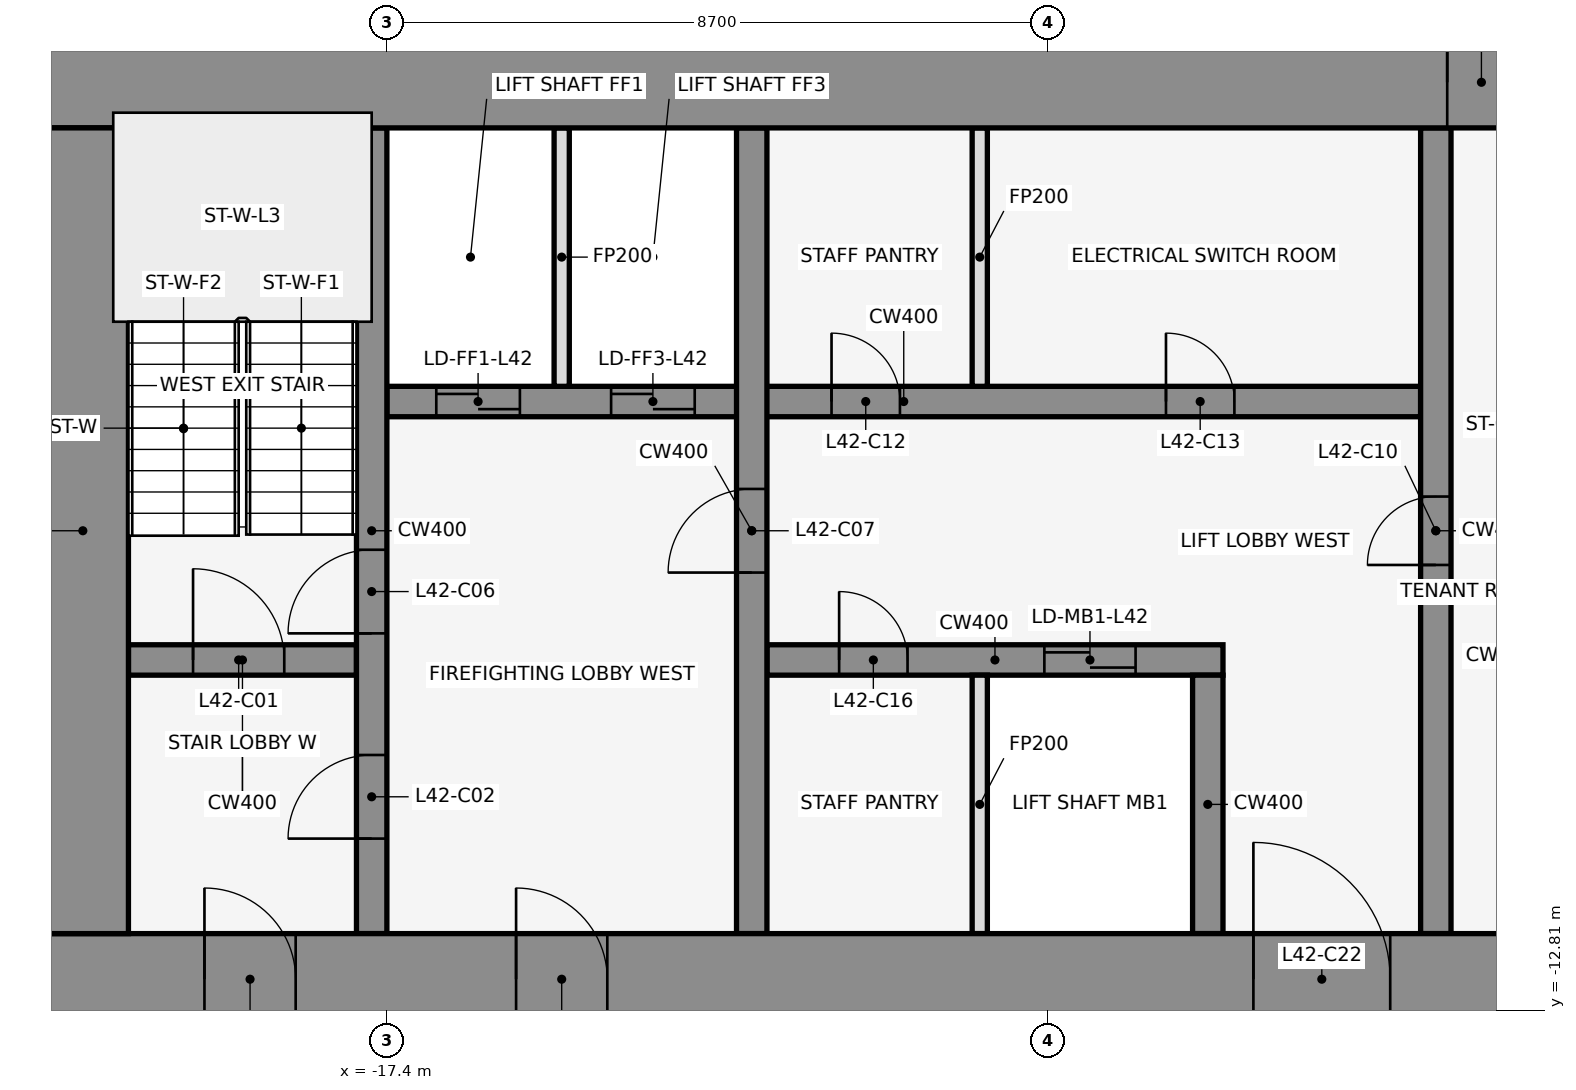
"""IFC4 building model, lengths in metres.
Left out: names, types, materials, properties, quantities, classifications, styles, units other than length and angle.
Written with IfcOpenShell. Run it as: python <this file> out.ifc"""

import sys

from ifc_helpers import new_model, si_unit, direction, frame, frame_2d, origin, place, context, subcontext, project, spatial, rectangle, extrude, element, fill, save


model = new_model("IFC4")
c1 = context("Model", 3, precision=1e-05, world=origin(), true_north=direction((0.0, 1.0)))
c2 = subcontext(c1, "Body", "Model", "MODEL_VIEW")
j1 = project(units=[si_unit("LENGTHUNIT", "METRE"), si_unit("PLANEANGLEUNIT", "RADIAN")], contexts=[c1])
p1 = place(None, origin())
s1 = spatial("IfcSite", under=j1, at=p1, CompositionType="ELEMENT")
p2 = place(p1, origin())
s2 = spatial("IfcBuilding", under=s1, at=p2, CompositionType="ELEMENT")
p3 = place(p2, frame((0.0, 0.0, 190.9)))
s3 = spatial("IfcBuildingStorey", under=s2, at=p3, CompositionType="ELEMENT", Elevation=190.9)
p4 = place(p3, frame((-14.599, 1.08, 0.0), z_axis=(0.0, 0.0, 1.0), x_axis=(-0.83981312244, -0.542875602121, 0.0)))
e1 = element("IfcWall", 1, at=p4, inside=s3, PredefinedType="STANDARD", context=c2, shape_type="SweptSolid", body=[
    extrude(rectangle(XDim=2.183, YDim=0.25, at=frame_2d((1.091, 0.0))), origin(), (0.0, 0.0, 1.0), 3.95),
])
p5 = place(p3, frame((-20.8, -8.2, 0.0), z_axis=(0.0, 0.0, 1.0), x_axis=(1.0, 0.0, 0.0)))
e2 = element("IfcWall", 2, at=p5, inside=s3, PredefinedType="SHEAR", context=c2, shape_type="SweptSolid", body=[
    extrude(rectangle(XDim=3.0, YDim=0.4, at=frame_2d((1.5, 0.0))), origin(), (0.0, 0.0, 1.0), 4.1),
])
p6 = place(p5, frame((0.85, 0.0, 0.0)))
e3 = element("IfcOpeningElement", 3, at=p6, cuts=e2, PredefinedType="OPENING", context=c2, shape_type="SweptSolid", body=[
    extrude(rectangle(XDim=1.2, YDim=2.1, at=frame_2d((0.6, 1.05))), frame((0.0, 0.212, 0.0), z_axis=(0.0, -1.0, 0.0), x_axis=(1.0, 0.0, 0.0)), (0.0, 0.0, 1.0), 0.424),
])
p7 = place(p3, frame((-12.4, -8.2, 0.0), z_axis=(0.0, 0.0, 1.0), x_axis=(1.0, 0.0, 0.0)))
e4 = element("IfcWall", 4, at=p7, inside=s3, PredefinedType="SHEAR", context=c2, shape_type="SweptSolid", body=[
    extrude(rectangle(XDim=6.0, YDim=0.4, at=frame_2d((3.0, 0.0))), origin(), (0.0, 0.0, 1.0), 4.1),
])
p8 = place(p7, frame((3.65, 0.0, 0.0)))
e5 = element("IfcOpeningElement", 5, at=p8, cuts=e4, PredefinedType="OPENING", context=c2, shape_type="SweptSolid", body=[
    extrude(rectangle(XDim=1.2, YDim=2.1, at=frame_2d((0.6, 1.05))), frame((0.0, 0.212, 0.0), z_axis=(0.0, -1.0, 0.0), x_axis=(1.0, 0.0, 0.0)), (0.0, 0.0, 1.0), 0.424),
])
p9 = place(p7, frame((0.95, 0.0, 0.0)))
e6 = element("IfcOpeningElement", 6, at=p9, cuts=e4, PredefinedType="OPENING", context=c2, shape_type="SweptSolid", body=[
    extrude(rectangle(XDim=0.9, YDim=2.1, at=frame_2d((0.45, 1.05))), frame((0.0, 0.212, 0.0), z_axis=(0.0, -1.0, 0.0), x_axis=(1.0, 0.0, 0.0)), (0.0, 0.0, 1.0), 0.424),
])
p10 = place(p3, frame((-17.4, -4.8, 0.0), z_axis=(0.0, 0.0, 1.0), x_axis=(1.0, 0.0, 0.0)))
e7 = element("IfcWall", 7, at=p10, inside=s3, PredefinedType="SHEAR", context=c2, shape_type="SweptSolid", body=[
    extrude(rectangle(XDim=13.6, YDim=0.4, at=frame_2d((6.8, 0.0))), origin(), (0.0, 0.0, 1.0), 4.1),
])
p11 = place(p10, frame((0.65, 0.0, 0.0)))
e8 = element("IfcOpeningElement", 8, at=p11, cuts=e7, PredefinedType="OPENING", context=c2, shape_type="SweptSolid", body=[
    extrude(rectangle(XDim=1.1, YDim=2.1, at=frame_2d((0.55, 1.05))), frame((0.0, 0.212, 0.0), z_axis=(0.0, -1.0, 0.0), x_axis=(1.0, 0.0, 0.0)), (0.0, 0.0, 1.0), 0.424),
])
p12 = place(p10, frame((2.95, 0.0, 0.0)))
e9 = element("IfcOpeningElement", 9, at=p12, cuts=e7, PredefinedType="OPENING", context=c2, shape_type="SweptSolid", body=[
    extrude(rectangle(XDim=1.1, YDim=2.1, at=frame_2d((0.55, 1.05))), frame((0.0, 0.212, 0.0), z_axis=(0.0, -1.0, 0.0), x_axis=(1.0, 0.0, 0.0)), (0.0, 0.0, 1.0), 0.424),
])
p13 = place(p10, frame((5.85, 0.0, 0.0)))
e10 = element("IfcOpeningElement", 10, at=p13, cuts=e7, PredefinedType="OPENING", context=c2, shape_type="SweptSolid", body=[
    extrude(rectangle(XDim=0.9, YDim=2.1, at=frame_2d((0.45, 1.05))), frame((0.0, 0.212, 0.0), z_axis=(0.0, -1.0, 0.0), x_axis=(1.0, 0.0, 0.0)), (0.0, 0.0, 1.0), 0.424),
])
p14 = place(p10, frame((10.25, 0.0, 0.0)))
e11 = element("IfcOpeningElement", 11, at=p14, cuts=e7, PredefinedType="OPENING", context=c2, shape_type="SweptSolid", body=[
    extrude(rectangle(XDim=0.9, YDim=2.1, at=frame_2d((0.45, 1.05))), frame((0.0, 0.212, 0.0), z_axis=(0.0, -1.0, 0.0), x_axis=(1.0, 0.0, 0.0)), (0.0, 0.0, 1.0), 0.424),
])
p15 = place(p3, frame((-17.6, -11.8, 0.0), z_axis=(0.0, 0.0, 1.0), x_axis=(0.0, 1.0, 0.0)))
e12 = element("IfcWall", 12, at=p15, inside=s3, PredefinedType="SHEAR", context=c2, shape_type="SweptSolid", body=[
    extrude(rectangle(XDim=10.6, YDim=0.4, at=frame_2d((5.3, 0.0))), origin(), (0.0, 0.0, 1.0), 4.1),
])
p16 = place(p15, frame((1.25, 0.0, 0.0)))
e13 = element("IfcOpeningElement", 13, at=p16, cuts=e12, PredefinedType="OPENING", context=c2, shape_type="SweptSolid", body=[
    extrude(rectangle(XDim=1.1, YDim=2.1, at=frame_2d((0.55, 1.05))), frame((0.0, 0.212, 0.0), z_axis=(0.0, -1.0, 0.0), x_axis=(1.0, 0.0, 0.0)), (0.0, 0.0, 1.0), 0.424),
])
p17 = place(p15, frame((3.95, 0.0, 0.0)))
e14 = element("IfcOpeningElement", 14, at=p17, cuts=e12, PredefinedType="OPENING", context=c2, shape_type="SweptSolid", body=[
    extrude(rectangle(XDim=1.1, YDim=2.1, at=frame_2d((0.55, 1.05))), frame((0.0, 0.212, 0.0), z_axis=(0.0, -1.0, 0.0), x_axis=(1.0, 0.0, 0.0)), (0.0, 0.0, 1.0), 0.424),
])
p18 = place(p3, frame((-15.1, -4.6, 0.0), z_axis=(0.0, 0.0, 1.0), x_axis=(0.0, 1.0, 0.0)))
e15 = element("IfcWall", 15, at=p18, inside=s3, PredefinedType="PARTITIONING", context=c2, shape_type="SweptSolid", body=[
    extrude(rectangle(XDim=3.4, YDim=0.2, at=frame_2d((1.7, 0.0))), origin(), (0.0, 0.0, 1.0), 2.96),
])
p19 = place(p3, frame((-12.6, -11.8, 0.0), z_axis=(0.0, 0.0, 1.0), x_axis=(0.0, 1.0, 0.0)))
e16 = element("IfcWall", 16, at=p19, inside=s3, PredefinedType="SHEAR", context=c2, shape_type="SweptSolid", body=[
    extrude(rectangle(XDim=10.6, YDim=0.4, at=frame_2d((5.3, 0.0))), origin(), (0.0, 0.0, 1.0), 4.1),
])
p20 = place(p19, frame((4.75, 0.0, 0.0)))
e17 = element("IfcOpeningElement", 17, at=p20, cuts=e16, PredefinedType="OPENING", context=c2, shape_type="SweptSolid", body=[
    extrude(rectangle(XDim=1.1, YDim=2.1, at=frame_2d((0.55, 1.05))), frame((0.0, 0.212, 0.0), z_axis=(0.0, -1.0, 0.0), x_axis=(1.0, 0.0, 0.0)), (0.0, 0.0, 1.0), 0.424),
])
for number, where, z_axis, x_axis in (
    (18, (-9.6, -11.8, 0.0), (0.0, 0.0, 1.0), (0.0, 1.0, 0.0)),
    (19, (-9.6, -4.6, 0.0), (0.0, 0.0, 1.0), (0.0, 1.0, 0.0)),
):
    element("IfcWall", number, at=place(p3, frame(where, z_axis=z_axis, x_axis=x_axis)), inside=s3, PredefinedType="PARTITIONING", context=c2, shape_type="SweptSolid", body=[
        extrude(rectangle(XDim=3.4, YDim=0.2, at=frame_2d((1.7, 0.0))), origin(), (0.0, 0.0, 1.0), 2.96),
    ])
p21 = place(p3, frame((-6.6, -11.8, 0.0), z_axis=(0.0, 0.0, 1.0), x_axis=(0.0, 1.0, 0.0)))
e20 = element("IfcWall", 20, at=p21, inside=s3, PredefinedType="SHEAR", context=c2, shape_type="SweptSolid", body=[
    extrude(rectangle(XDim=3.4, YDim=0.4, at=frame_2d((1.7, 0.0))), origin(), (0.0, 0.0, 1.0), 4.1),
])
p22 = place(p3, frame((-3.6, -11.8, 0.0), z_axis=(0.0, 0.0, 1.0), x_axis=(0.0, 1.0, 0.0)))
e21 = element("IfcWall", 21, at=p22, inside=s3, PredefinedType="SHEAR", context=c2, shape_type="SweptSolid", body=[
    extrude(rectangle(XDim=10.6, YDim=0.4, at=frame_2d((5.3, 0.0))), origin(), (0.0, 0.0, 1.0), 4.1),
])
p23 = place(p22, frame((4.85, 0.0, 0.0)))
e22 = element("IfcOpeningElement", 22, at=p23, cuts=e21, PredefinedType="OPENING", context=c2, shape_type="SweptSolid", body=[
    extrude(rectangle(XDim=0.9, YDim=2.1, at=frame_2d((0.45, 1.05))), frame((0.0, 0.212, 0.0), z_axis=(0.0, -1.0, 0.0), x_axis=(1.0, 0.0, 0.0)), (0.0, 0.0, 1.0), 0.424),
])
p24 = place(p3, frame((-22.0, -0.6, 0.0), z_axis=(0.0, 0.0, 1.0), x_axis=(1.0, 0.0, 0.0)))
e23 = element("IfcWall", 23, at=p24, inside=s3, PredefinedType="SHEAR", context=c2, shape_type="SweptSolid", body=[
    extrude(rectangle(XDim=44.0, YDim=1.2, at=frame_2d((22.0, 0.0))), origin(), (0.0, 0.0, 1.0), 4.1),
])
p25 = place(p24, frame((18.55, 0.0, 0.0)))
e24 = element("IfcOpeningElement", 24, at=p25, cuts=e23, PredefinedType="OPENING", context=c2, shape_type="SweptSolid", body=[
    extrude(rectangle(XDim=0.9, YDim=2.1, at=frame_2d((0.45, 1.05))), frame((0.0, 0.612, 0.0), z_axis=(0.0, -1.0, 0.0), x_axis=(1.0, 0.0, 0.0)), (0.0, 0.0, 1.0), 1.224),
])
p26 = place(p24, frame((24.55, 0.0, 0.0)))
e25 = element("IfcOpeningElement", 25, at=p26, cuts=e23, PredefinedType="OPENING", context=c2, shape_type="SweptSolid", body=[
    extrude(rectangle(XDim=0.9, YDim=2.1, at=frame_2d((0.45, 1.05))), frame((0.0, 0.612, 0.0), z_axis=(0.0, -1.0, 0.0), x_axis=(1.0, 0.0, 0.0)), (0.0, 0.0, 1.0), 1.224),
])
p27 = place(p3, frame((-22.0, -12.4, 0.0), z_axis=(0.0, 0.0, 1.0), x_axis=(1.0, 0.0, 0.0)))
e26 = element("IfcWall", 26, at=p27, inside=s3, PredefinedType="SHEAR", context=c2, shape_type="SweptSolid", body=[
    extrude(rectangle(XDim=44.0, YDim=1.2, at=frame_2d((22.0, 0.0))), origin(), (0.0, 0.0, 1.0), 4.1),
])
p28 = place(p27, frame((2.2, 0.0, 0.0)))
e27 = element("IfcOpeningElement", 27, at=p28, cuts=e26, PredefinedType="OPENING", context=c2, shape_type="SweptSolid", body=[
    extrude(rectangle(XDim=1.2, YDim=2.1, at=frame_2d((0.6, 1.05))), frame((0.0, 0.612, 0.0), z_axis=(0.0, -1.0, 0.0), x_axis=(1.0, 0.0, 0.0)), (0.0, 0.0, 1.0), 1.224),
])
p29 = place(p27, frame((21.4, 0.0, 0.0)))
e28 = element("IfcOpeningElement", 28, at=p29, cuts=e26, PredefinedType="OPENING", context=c2, shape_type="SweptSolid", body=[
    extrude(rectangle(XDim=1.2, YDim=2.1, at=frame_2d((0.6, 1.05))), frame((0.0, 0.612, 0.0), z_axis=(0.0, -1.0, 0.0), x_axis=(1.0, 0.0, 0.0)), (0.0, 0.0, 1.0), 1.224),
])
p30 = place(p27, frame((40.6, 0.0, 0.0)))
e29 = element("IfcOpeningElement", 29, at=p30, cuts=e26, PredefinedType="OPENING", context=c2, shape_type="SweptSolid", body=[
    extrude(rectangle(XDim=1.2, YDim=2.1, at=frame_2d((0.6, 1.05))), frame((0.0, 0.612, 0.0), z_axis=(0.0, -1.0, 0.0), x_axis=(1.0, 0.0, 0.0)), (0.0, 0.0, 1.0), 1.224),
])
p31 = place(p27, frame((16.0, 0.0, 0.0)))
e30 = element("IfcOpeningElement", 30, at=p31, cuts=e26, PredefinedType="OPENING", context=c2, shape_type="SweptSolid", body=[
    extrude(rectangle(XDim=1.8, YDim=2.1, at=frame_2d((0.9, 1.05))), frame((0.0, 0.612, 0.0), z_axis=(0.0, -1.0, 0.0), x_axis=(1.0, 0.0, 0.0)), (0.0, 0.0, 1.0), 1.224),
])
p32 = place(p27, frame((6.3, 0.0, 0.0)))
e31 = element("IfcOpeningElement", 31, at=p32, cuts=e26, PredefinedType="OPENING", context=c2, shape_type="SweptSolid", body=[
    extrude(rectangle(XDim=1.2, YDim=2.1, at=frame_2d((0.6, 1.05))), frame((0.0, 0.612, 0.0), z_axis=(0.0, -1.0, 0.0), x_axis=(1.0, 0.0, 0.0)), (0.0, 0.0, 1.0), 1.224),
])
p33 = place(p27, frame((26.2, 0.0, 0.0)))
e32 = element("IfcOpeningElement", 32, at=p33, cuts=e26, PredefinedType="OPENING", context=c2, shape_type="SweptSolid", body=[
    extrude(rectangle(XDim=1.8, YDim=2.1, at=frame_2d((0.9, 1.05))), frame((0.0, 0.612, 0.0), z_axis=(0.0, -1.0, 0.0), x_axis=(1.0, 0.0, 0.0)), (0.0, 0.0, 1.0), 1.224),
])
p34 = place(p27, frame((36.5, 0.0, 0.0)))
e33 = element("IfcOpeningElement", 33, at=p34, cuts=e26, PredefinedType="OPENING", context=c2, shape_type="SweptSolid", body=[
    extrude(rectangle(XDim=1.2, YDim=2.1, at=frame_2d((0.6, 1.05))), frame((0.0, 0.612, 0.0), z_axis=(0.0, -1.0, 0.0), x_axis=(1.0, 0.0, 0.0)), (0.0, 0.0, 1.0), 1.224),
])
p35 = place(p3, frame((-21.4, -11.8, 0.0), z_axis=(0.0, 0.0, 1.0), x_axis=(0.0, 1.0, 0.0)))
e34 = element("IfcWall", 34, at=p35, inside=s3, PredefinedType="SHEAR", context=c2, shape_type="SweptSolid", body=[
    extrude(rectangle(XDim=10.6, YDim=1.2, at=frame_2d((5.3, 0.0))), origin(), (0.0, 0.0, 1.0), 4.1),
])
p36 = place(p6, origin())
e35 = element("IfcDoor", 35, at=p36, inside=s3, OperationType="SINGLE_SWING_LEFT", PredefinedType="DOOR", context=c2, shape_type="SweptSolid", body=[
    extrude(rectangle(XDim=1.2, YDim=2.1, at=frame_2d((0.6, 1.05))), frame((0.0, 0.025, 0.0), z_axis=(0.0, -1.0, 0.0), x_axis=(1.0, 0.0, 0.0)), (0.0, 0.0, 1.0), 0.05),
])
fill(e3, e35)
p37 = place(p16, frame((1.1, 0.0, 0.0), z_axis=(0.0, 0.0, 1.0), x_axis=(-1.0, 0.0, 0.0)))
e36 = element("IfcDoor", 36, at=p37, inside=s3, OperationType="SINGLE_SWING_LEFT", PredefinedType="DOOR", context=c2, shape_type="SweptSolid", body=[
    extrude(rectangle(XDim=1.1, YDim=2.1, at=frame_2d((0.55, 1.05))), frame((0.0, 0.025, 0.0), z_axis=(0.0, -1.0, 0.0), x_axis=(1.0, 0.0, 0.0)), (0.0, 0.0, 1.0), 0.05),
])
fill(e13, e36)
p38 = place(p11, origin())
e37 = element("IfcDoor", 37, at=p38, inside=s3, OperationType="DOUBLE_DOOR_SLIDING", PredefinedType="DOOR", context=c2, shape_type="SweptSolid", body=[
    extrude(rectangle(XDim=1.1, YDim=2.1, at=frame_2d((0.55, 1.05))), frame((0.0, 0.025, 0.0), z_axis=(0.0, -1.0, 0.0), x_axis=(1.0, 0.0, 0.0)), (0.0, 0.0, 1.0), 0.05),
])
fill(e8, e37)
p39 = place(p12, origin())
e38 = element("IfcDoor", 38, at=p39, inside=s3, OperationType="DOUBLE_DOOR_SLIDING", PredefinedType="DOOR", context=c2, shape_type="SweptSolid", body=[
    extrude(rectangle(XDim=1.1, YDim=2.1, at=frame_2d((0.55, 1.05))), frame((0.0, 0.025, 0.0), z_axis=(0.0, -1.0, 0.0), x_axis=(1.0, 0.0, 0.0)), (0.0, 0.0, 1.0), 0.05),
])
fill(e9, e38)
p40 = place(p8, origin())
e39 = element("IfcDoor", 39, at=p40, inside=s3, OperationType="DOUBLE_DOOR_SLIDING", PredefinedType="DOOR", context=c2, shape_type="SweptSolid", body=[
    extrude(rectangle(XDim=1.2, YDim=2.1, at=frame_2d((0.6, 1.05))), frame((0.0, 0.025, 0.0), z_axis=(0.0, -1.0, 0.0), x_axis=(1.0, 0.0, 0.0)), (0.0, 0.0, 1.0), 0.05),
])
fill(e5, e39)
p41 = place(p17, frame((1.1, 0.0, 0.0), z_axis=(0.0, 0.0, 1.0), x_axis=(-1.0, 0.0, 0.0)))
e40 = element("IfcDoor", 40, at=p41, inside=s3, OperationType="SINGLE_SWING_LEFT", PredefinedType="DOOR", context=c2, shape_type="SweptSolid", body=[
    extrude(rectangle(XDim=1.1, YDim=2.1, at=frame_2d((0.55, 1.05))), frame((0.0, 0.025, 0.0), z_axis=(0.0, -1.0, 0.0), x_axis=(1.0, 0.0, 0.0)), (0.0, 0.0, 1.0), 0.05),
])
fill(e14, e40)
p42 = place(p20, origin())
e41 = element("IfcDoor", 41, at=p42, inside=s3, OperationType="SINGLE_SWING_LEFT", PredefinedType="DOOR", context=c2, shape_type="SweptSolid", body=[
    extrude(rectangle(XDim=1.1, YDim=2.1, at=frame_2d((0.55, 1.05))), frame((0.0, 0.025, 0.0), z_axis=(0.0, -1.0, 0.0), x_axis=(1.0, 0.0, 0.0)), (0.0, 0.0, 1.0), 0.05),
])
fill(e17, e41)
p43 = place(p23, frame((0.9, 0.0, 0.0), z_axis=(0.0, 0.0, 1.0), x_axis=(-1.0, 0.0, 0.0)))
e42 = element("IfcDoor", 42, at=p43, inside=s3, OperationType="SINGLE_SWING_LEFT", PredefinedType="DOOR", context=c2, shape_type="SweptSolid", body=[
    extrude(rectangle(XDim=0.9, YDim=2.1, at=frame_2d((0.45, 1.05))), frame((0.0, 0.025, 0.0), z_axis=(0.0, -1.0, 0.0), x_axis=(1.0, 0.0, 0.0)), (0.0, 0.0, 1.0), 0.05),
])
fill(e22, e42)
p44 = place(p13, origin())
e43 = element("IfcDoor", 43, at=p44, inside=s3, OperationType="SINGLE_SWING_RIGHT", PredefinedType="DOOR", context=c2, shape_type="SweptSolid", body=[
    extrude(rectangle(XDim=0.9, YDim=2.1, at=frame_2d((0.45, 1.05))), frame((0.0, 0.025, 0.0), z_axis=(0.0, -1.0, 0.0), x_axis=(1.0, 0.0, 0.0)), (0.0, 0.0, 1.0), 0.05),
])
fill(e10, e43)
p45 = place(p14, origin())
e44 = element("IfcDoor", 44, at=p45, inside=s3, OperationType="SINGLE_SWING_LEFT", PredefinedType="DOOR", context=c2, shape_type="SweptSolid", body=[
    extrude(rectangle(XDim=0.9, YDim=2.1, at=frame_2d((0.45, 1.05))), frame((0.0, 0.025, 0.0), z_axis=(0.0, -1.0, 0.0), x_axis=(1.0, 0.0, 0.0)), (0.0, 0.0, 1.0), 0.05),
])
fill(e11, e44)
p46 = place(p9, frame((0.9, 0.0, 0.0), z_axis=(0.0, 0.0, 1.0), x_axis=(-1.0, 0.0, 0.0)))
e45 = element("IfcDoor", 45, at=p46, inside=s3, OperationType="SINGLE_SWING_LEFT", PredefinedType="DOOR", context=c2, shape_type="SweptSolid", body=[
    extrude(rectangle(XDim=0.9, YDim=2.1, at=frame_2d((0.45, 1.05))), frame((0.0, 0.025, 0.0), z_axis=(0.0, -1.0, 0.0), x_axis=(1.0, 0.0, 0.0)), (0.0, 0.0, 1.0), 0.05),
])
fill(e6, e45)
p47 = place(p25, origin())
e46 = element("IfcDoor", 46, at=p47, inside=s3, OperationType="SINGLE_SWING_LEFT", PredefinedType="DOOR", context=c2, shape_type="SweptSolid", body=[
    extrude(rectangle(XDim=0.9, YDim=2.1, at=frame_2d((0.45, 1.05))), frame((0.0, 0.025, 0.0), z_axis=(0.0, -1.0, 0.0), x_axis=(1.0, 0.0, 0.0)), (0.0, 0.0, 1.0), 0.05),
])
fill(e24, e46)
p48 = place(p28, frame((1.2, 0.0, 0.0), z_axis=(0.0, 0.0, 1.0), x_axis=(-1.0, 0.0, 0.0)))
e47 = element("IfcDoor", 47, at=p48, inside=s3, OperationType="SINGLE_SWING_RIGHT", PredefinedType="DOOR", context=c2, shape_type="SweptSolid", body=[
    extrude(rectangle(XDim=1.2, YDim=2.1, at=frame_2d((0.6, 1.05))), frame((0.0, 0.025, 0.0), z_axis=(0.0, -1.0, 0.0), x_axis=(1.0, 0.0, 0.0)), (0.0, 0.0, 1.0), 0.05),
])
fill(e27, e47)
p49 = place(p31, origin())
e48 = element("IfcDoor", 48, at=p49, inside=s3, OperationType="SINGLE_SWING_LEFT", PredefinedType="DOOR", context=c2, shape_type="SweptSolid", body=[
    extrude(rectangle(XDim=1.8, YDim=2.1, at=frame_2d((0.9, 1.05))), frame((0.0, 0.025, 0.0), z_axis=(0.0, -1.0, 0.0), x_axis=(1.0, 0.0, 0.0)), (0.0, 0.0, 1.0), 0.05),
])
fill(e30, e48)
p50 = place(p32, frame((1.2, 0.0, 0.0), z_axis=(0.0, 0.0, 1.0), x_axis=(-1.0, 0.0, 0.0)))
e49 = element("IfcDoor", 49, at=p50, inside=s3, OperationType="SINGLE_SWING_RIGHT", PredefinedType="DOOR", context=c2, shape_type="SweptSolid", body=[
    extrude(rectangle(XDim=1.2, YDim=2.1, at=frame_2d((0.6, 1.05))), frame((0.0, 0.025, 0.0), z_axis=(0.0, -1.0, 0.0), x_axis=(1.0, 0.0, 0.0)), (0.0, 0.0, 1.0), 0.05),
])
fill(e31, e49)
save(model, sys.argv[1])
